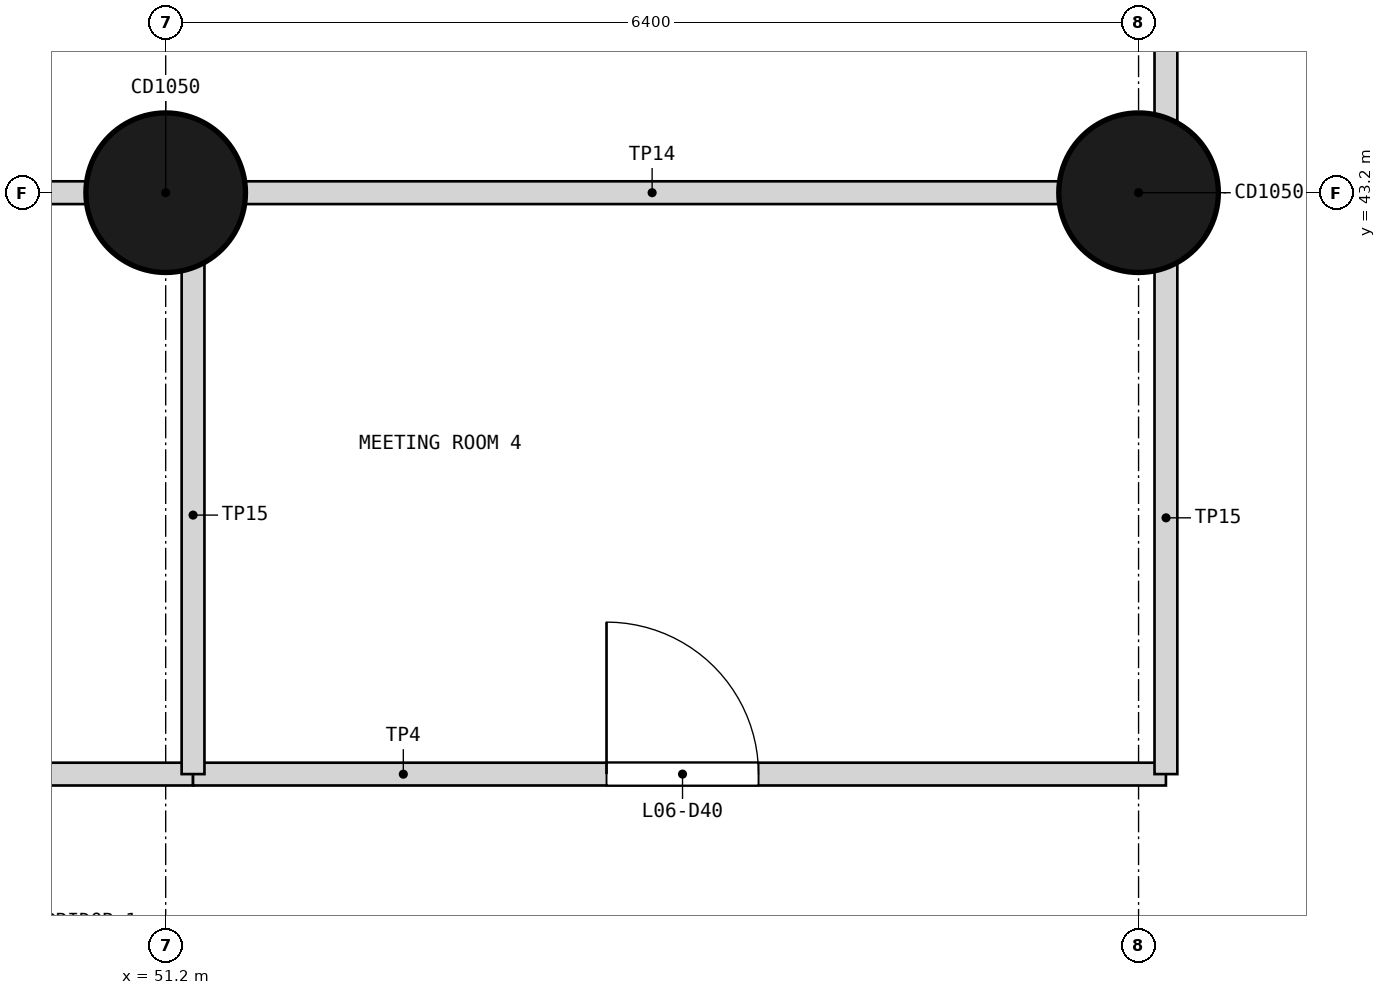
"""IFC4 building model, lengths in metres.
Left out: names, types, materials, properties, quantities, classifications, styles, units other than length and angle.
Written with IfcOpenShell. Run it as: python <this file> out.ifc"""

import sys

from ifc_helpers import new_model, si_unit, direction, frame, frame_2d, origin, origin_2d, place, context, subcontext, project, spatial, rectangle, circle, extrude, element, fill, save


model = new_model("IFC4")
c1 = context("Model", 3, precision=1e-05, world=origin(), true_north=direction((0.0, 1.0)))
c2 = subcontext(c1, "Body", "Model", "MODEL_VIEW")
j1 = project(units=[si_unit("LENGTHUNIT", "METRE"), si_unit("PLANEANGLEUNIT", "RADIAN")], contexts=[c1])
p1 = place(None, origin())
s1 = spatial("IfcSite", under=j1, at=p1, CompositionType="ELEMENT")
p2 = place(p1, origin())
s2 = spatial("IfcBuilding", under=s1, at=p2, CompositionType="ELEMENT")
p3 = place(p2, frame((0.0, 0.0, 24.9)))
s3 = spatial("IfcBuildingStorey", under=s2, at=p3, CompositionType="ELEMENT", Elevation=24.9)
for number, where, z_axis, x_axis in (
    (1, (51.2, 43.2, 0.0), (0.0, 0.0, 1.0), (1.0, 0.0, 0.0)),
    (2, (57.6, 43.2, 0.0), (0.0, 0.0, 1.0), (1.0, 0.0, 0.0)),
):
    element("IfcColumn", number, at=place(p3, frame(where, z_axis=z_axis, x_axis=x_axis)), inside=s3, PredefinedType="COLUMN", context=c2, shape_type="SweptSolid", body=[
        extrude(circle(Radius=0.525, at=origin_2d()), origin(), (0.0, 0.0, 1.0), 3.9),
    ])
p4 = place(p3, frame((44.62, 39.375, 0.0), z_axis=(0.0, 0.0, 1.0), x_axis=(1.0, 0.0, 0.0)))
e3 = element("IfcWall", 3, at=p4, inside=s3, PredefinedType="PARTITIONING", context=c2, shape_type="SweptSolid", body=[
    extrude(rectangle(XDim=6.76, YDim=0.15, at=frame_2d((3.38, 0.0))), origin(), (0.0, 0.0, 1.0), 3.68),
])
p5 = place(p4, frame((2.48, 0.0, 0.0)))
e4 = element("IfcOpeningElement", 4, at=p5, cuts=e3, PredefinedType="OPENING", context=c2, shape_type="SweptSolid", body=[
    extrude(rectangle(XDim=1.8, YDim=2.1, at=frame_2d((0.9, 1.05))), frame((0.0, 0.085, 0.0), z_axis=(0.0, -1.0, 0.0), x_axis=(1.0, 0.0, 0.0)), (0.0, 0.0, 1.0), 0.17),
])
p6 = place(p3, frame((51.38, 39.375, 0.0), z_axis=(0.0, 0.0, 1.0), x_axis=(1.0, 0.0, 0.0)))
e5 = element("IfcWall", 5, at=p6, inside=s3, PredefinedType="PARTITIONING", context=c2, shape_type="SweptSolid", body=[
    extrude(rectangle(XDim=6.4, YDim=0.15, at=frame_2d((3.2, 0.0))), origin(), (0.0, 0.0, 1.0), 3.68),
])
p7 = place(p6, frame((2.72, 0.0, 0.0)))
e6 = element("IfcOpeningElement", 6, at=p7, cuts=e5, PredefinedType="OPENING", context=c2, shape_type="SweptSolid", body=[
    extrude(rectangle(XDim=1.0, YDim=2.1, at=frame_2d((0.5, 1.05))), frame((0.0, 0.085, 0.0), z_axis=(0.0, -1.0, 0.0), x_axis=(1.0, 0.0, 0.0)), (0.0, 0.0, 1.0), 0.17),
])
p8 = place(p3, frame((51.38, 39.375, 0.0), z_axis=(0.0, 0.0, 1.0), x_axis=(0.0, 1.0, 0.0)))
e7 = element("IfcWall", 7, at=p8, inside=s3, PredefinedType="PARTITIONING", context=c2, shape_type="SweptSolid", body=[
    extrude(rectangle(XDim=3.352, YDim=0.15, at=frame_2d((1.676, 0.0))), origin(), (0.0, 0.0, 1.0), 2.78),
])
p9 = place(p3, frame((31.82, 43.2, 0.0), z_axis=(0.0, 0.0, 1.0), x_axis=(1.0, 0.0, 0.0)))
e8 = element("IfcWall", 8, at=p9, inside=s3, PredefinedType="PARTITIONING", context=c2, shape_type="SweptSolid", body=[
    extrude(rectangle(XDim=25.96, YDim=0.15, at=frame_2d((12.98, 0.0))), origin(), (0.0, 0.0, 1.0), 2.88),
])
p10 = place(p9, frame((13.825, 0.0, 0.0)))
e9 = element("IfcOpeningElement", 9, at=p10, cuts=e8, PredefinedType="OPENING", context=c2, shape_type="SweptSolid", body=[
    extrude(rectangle(XDim=1.8, YDim=2.1, at=frame_2d((0.9, 1.05))), frame((0.0, 0.085, 0.0), z_axis=(0.0, -1.0, 0.0), x_axis=(1.0, 0.0, 0.0)), (0.0, 0.0, 1.0), 0.17),
])
p11 = place(p9, frame((16.725, 0.0, 0.0)))
e10 = element("IfcOpeningElement", 10, at=p11, cuts=e8, PredefinedType="OPENING", context=c2, shape_type="SweptSolid", body=[
    extrude(rectangle(XDim=1.8, YDim=2.1, at=frame_2d((0.9, 1.05))), frame((0.0, 0.085, 0.0), z_axis=(0.0, -1.0, 0.0), x_axis=(1.0, 0.0, 0.0)), (0.0, 0.0, 1.0), 0.17),
])
p12 = place(p3, frame((57.78, 39.375, 0.0), z_axis=(0.0, 0.0, 1.0), x_axis=(0.0, 1.0, 0.0)))
e11 = element("IfcWall", 11, at=p12, inside=s3, PredefinedType="PARTITIONING", context=c2, shape_type="SweptSolid", body=[
    extrude(rectangle(XDim=3.352, YDim=0.15, at=frame_2d((1.676, 0.0))), origin(), (0.0, 0.0, 1.0), 2.78),
])
p13 = place(p3, frame((57.78, 43.673, 0.0), z_axis=(0.0, 0.0, 1.0), x_axis=(0.0, 1.0, 0.0)))
e12 = element("IfcWall", 12, at=p13, inside=s3, PredefinedType="PARTITIONING", context=c2, shape_type="SweptSolid", body=[
    extrude(rectangle(XDim=8.522, YDim=0.15, at=frame_2d((4.261, 0.0))), origin(), (0.0, 0.0, 1.0), 2.78),
])
p14 = place(p7, origin())
e13 = element("IfcDoor", 13, at=p14, inside=s3, OperationType="SINGLE_SWING_LEFT", PredefinedType="DOOR", context=c2, shape_type="SweptSolid", body=[
    extrude(rectangle(XDim=1.0, YDim=2.1, at=frame_2d((0.5, 1.05))), frame((0.0, 0.025, 0.0), z_axis=(0.0, -1.0, 0.0), x_axis=(1.0, 0.0, 0.0)), (0.0, 0.0, 1.0), 0.05),
])
fill(e6, e13)
save(model, sys.argv[1])
